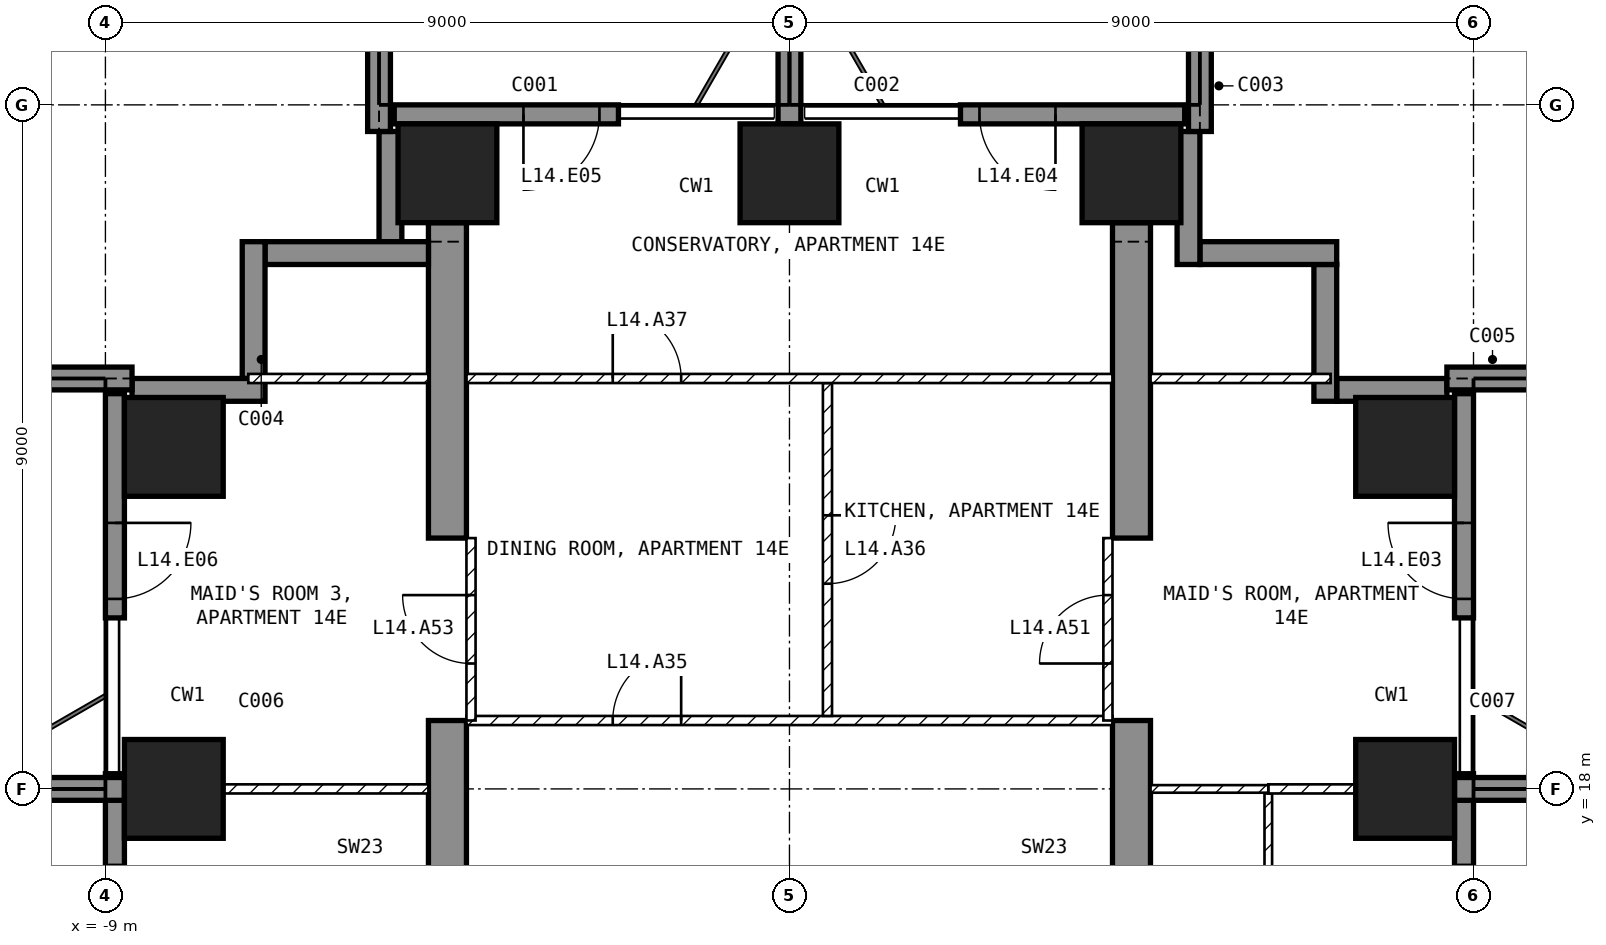
"""IFC4 building model, lengths in metres.
Left out: names, types, materials, properties, quantities, classifications, styles, units other than length and angle.
Written with IfcOpenShell. Run it as: python <this file> out.ifc"""

import sys

from ifc_helpers import new_model, si_unit, direction, frame, frame_2d, origin, origin_2d, place, context, subcontext, project, spatial, polyline, rectangle, outline, extrude, element, fill, save


model = new_model("IFC4")
c1 = context("Model", 3, precision=1e-05, world=origin(), true_north=direction((0.0, 1.0)))
c2 = subcontext(c1, "Body", "Model", "MODEL_VIEW")
j1 = project(units=[si_unit("LENGTHUNIT", "METRE"), si_unit("PLANEANGLEUNIT", "RADIAN")], contexts=[c1])
p1 = place(None, origin())
s1 = spatial("IfcSite", under=j1, at=p1, CompositionType="ELEMENT")
p2 = place(p1, origin())
s2 = spatial("IfcBuilding", under=s1, at=p2, CompositionType="ELEMENT")
p3 = place(p2, frame((0.0, 0.0, 68.0)))
s3 = spatial("IfcBuildingStorey", under=s2, at=p3, CompositionType="ELEMENT", Elevation=68.0)
for number, where, z_axis, x_axis in (
    (1, (-8.1, 18.0, -0.25), (0.0, 0.0, 1.0), (1.0, 0.0, 0.0)),
    (2, (-8.1, 22.5, -0.25), (0.0, 0.0, 1.0), (1.0, 0.0, 0.0)),
    (3, (-4.5, 26.1, -0.25), (0.0, 0.0, 1.0), (1.0, 0.0, 0.0)),
    (4, (0.0, 26.1, -0.25), (0.0, 0.0, 1.0), (1.0, 0.0, 0.0)),
    (5, (4.5, 26.1, -0.25), (0.0, 0.0, 1.0), (1.0, 0.0, 0.0)),
    (6, (8.1, 18.0, -0.25), (0.0, 0.0, 1.0), (1.0, 0.0, 0.0)),
    (7, (8.1, 22.5, -0.25), (0.0, 0.0, 1.0), (1.0, 0.0, 0.0)),
):
    element("IfcColumn", number, at=place(p3, frame(where, z_axis=z_axis, x_axis=x_axis)), inside=s3, PredefinedType="COLUMN", context=c2, shape_type="SweptSolid", body=[
        extrude(rectangle(XDim=1.3, YDim=1.3, at=origin_2d()), origin(), (0.0, 0.0, 1.0), 3.5),
    ])
for number, where, z_axis, x_axis in (
    (8, (-4.75, 9.0, -0.25), (1.0, 0.0, 0.0), (0.0, 1.0, 0.0)),
    (9, (4.25, 9.0, -0.25), (1.0, 0.0, 0.0), (0.0, 1.0, 0.0)),
):
    element("IfcWall", number, at=place(p3, frame(where, z_axis=z_axis, x_axis=x_axis)), inside=s3, PredefinedType="SHEAR", context=c2, shape_type="SweptSolid", body=[
        extrude(outline(polyline([(0.0, 0.0), (2.1, 0.0), (2.1, 2.65), (4.5, 2.65), (4.5, 0.0), (9.9, 0.0), (9.9, 2.65), (12.3, 2.65), (12.3, 0.0), (16.45, 0.0), (16.45, 3.5), (0.0, 3.5), (0.0, 0.0)])), origin(), (0.0, 0.0, 1.0), 0.5),
    ])
p4 = place(p3, frame((8.875, 15.55, 0.0), z_axis=(0.0, 0.0, 1.0), x_axis=(0.0, 1.0, 0.0)))
e10 = element("IfcWall", 10, at=p4, inside=s3, PredefinedType="SOLIDWALL", context=c2, shape_type="SweptSolid", body=[
    extrude(rectangle(XDim=2.65, YDim=0.25, at=frame_2d((1.325, 0.0))), origin(), (0.0, 0.0, 1.0), 3.25),
])
p5 = place(p4, frame((0.25, 0.0, 0.0)))
e11 = element("IfcOpeningElement", 11, at=p5, cuts=e10, PredefinedType="OPENING", context=c2, shape_type="SweptSolid", body=[
    extrude(rectangle(XDim=1.2, YDim=2.4, at=frame_2d((0.6, 1.2))), frame((0.0, 0.135, 0.0), z_axis=(0.0, -1.0, 0.0), x_axis=(1.0, 0.0, 0.0)), (0.0, 0.0, 1.0), 0.27),
])
p6 = place(p3, frame((8.875, 20.25, 0.0), z_axis=(0.0, 0.0, 1.0), x_axis=(0.0, 1.0, 0.0)))
e12 = element("IfcWall", 12, at=p6, inside=s3, PredefinedType="SOLIDWALL", context=c2, shape_type="SweptSolid", body=[
    extrude(rectangle(XDim=2.95, YDim=0.25, at=frame_2d((1.475, 0.0))), origin(), (0.0, 0.0, 1.0), 3.25),
])
p7 = place(p6, frame((0.25, 0.0, 0.0)))
e13 = element("IfcOpeningElement", 13, at=p7, cuts=e12, PredefinedType="OPENING", context=c2, shape_type="SweptSolid", body=[
    extrude(rectangle(XDim=1.0, YDim=2.4, at=frame_2d((0.5, 1.2))), frame((0.0, 0.135, 0.0), z_axis=(0.0, -1.0, 0.0), x_axis=(1.0, 0.0, 0.0)), (0.0, 0.0, 1.0), 0.27),
])
p8 = place(p3, frame((5.2, 26.875, 0.0), z_axis=(0.0, 0.0, 1.0), x_axis=(-1.0, 0.0, 0.0)))
e14 = element("IfcWall", 14, at=p8, inside=s3, PredefinedType="SOLIDWALL", context=c2, shape_type="SweptSolid", body=[
    extrude(rectangle(XDim=2.95, YDim=0.25, at=frame_2d((1.475, 0.0))), origin(), (0.0, 0.0, 1.0), 3.25),
])
p9 = place(p8, frame((1.7, 0.0, 0.0)))
e15 = element("IfcOpeningElement", 15, at=p9, cuts=e14, PredefinedType="OPENING", context=c2, shape_type="SweptSolid", body=[
    extrude(rectangle(XDim=1.0, YDim=2.4, at=frame_2d((0.5, 1.2))), frame((0.0, 0.135, 0.0), z_axis=(0.0, -1.0, 0.0), x_axis=(1.0, 0.0, 0.0)), (0.0, 0.0, 1.0), 0.27),
])
p10 = place(p3, frame((-2.25, 26.875, 0.0), z_axis=(0.0, 0.0, 1.0), x_axis=(-1.0, 0.0, 0.0)))
e16 = element("IfcWall", 16, at=p10, inside=s3, PredefinedType="SOLIDWALL", context=c2, shape_type="SweptSolid", body=[
    extrude(rectangle(XDim=2.95, YDim=0.25, at=frame_2d((1.475, 0.0))), origin(), (0.0, 0.0, 1.0), 3.25),
])
p11 = place(p10, frame((0.25, 0.0, 0.0)))
e17 = element("IfcOpeningElement", 17, at=p11, cuts=e16, PredefinedType="OPENING", context=c2, shape_type="SweptSolid", body=[
    extrude(rectangle(XDim=1.0, YDim=2.4, at=frame_2d((0.5, 1.2))), frame((0.0, 0.135, 0.0), z_axis=(0.0, -1.0, 0.0), x_axis=(1.0, 0.0, 0.0)), (0.0, 0.0, 1.0), 0.27),
])
p12 = place(p3, frame((-8.875, 23.2, 0.0), z_axis=(0.0, 0.0, 1.0), x_axis=(0.0, -1.0, 0.0)))
e18 = element("IfcWall", 18, at=p12, inside=s3, PredefinedType="SOLIDWALL", context=c2, shape_type="SweptSolid", body=[
    extrude(rectangle(XDim=2.95, YDim=0.25, at=frame_2d((1.475, 0.0))), origin(), (0.0, 0.0, 1.0), 3.25),
])
p13 = place(p12, frame((1.7, 0.0, 0.0)))
e19 = element("IfcOpeningElement", 19, at=p13, cuts=e18, PredefinedType="OPENING", context=c2, shape_type="SweptSolid", body=[
    extrude(rectangle(XDim=1.0, YDim=2.4, at=frame_2d((0.5, 1.2))), frame((0.0, 0.135, 0.0), z_axis=(0.0, -1.0, 0.0), x_axis=(1.0, 0.0, 0.0)), (0.0, 0.0, 1.0), 0.27),
])
p14 = place(p3, frame((-8.875, 18.2, 0.0), z_axis=(0.0, 0.0, 1.0), x_axis=(0.0, -1.0, 0.0)))
e20 = element("IfcWall", 20, at=p14, inside=s3, PredefinedType="SOLIDWALL", context=c2, shape_type="SweptSolid", body=[
    extrude(rectangle(XDim=2.65, YDim=0.25, at=frame_2d((1.325, 0.0))), origin(), (0.0, 0.0, 1.0), 3.25),
])
p15 = place(p14, frame((1.2, 0.0, 0.0)))
e21 = element("IfcOpeningElement", 21, at=p15, cuts=e20, PredefinedType="OPENING", context=c2, shape_type="SweptSolid", body=[
    extrude(rectangle(XDim=1.2, YDim=2.4, at=frame_2d((0.6, 1.2))), frame((0.0, 0.135, 0.0), z_axis=(0.0, -1.0, 0.0), x_axis=(1.0, 0.0, 0.0)), (0.0, 0.0, 1.0), 0.27),
])
p16 = place(p3, frame((8.65, 23.25, 0.0), z_axis=(0.0, 0.0, 1.0), x_axis=(-1.0, 0.0, 0.0)))
e22 = element("IfcWall", 22, at=p16, inside=s3, PredefinedType="SOLIDWALL", context=c2, shape_type="SweptSolid", body=[
    extrude(rectangle(XDim=1.45, YDim=0.3, at=frame_2d((0.725, 0.0))), origin(), (0.0, 0.0, 1.0), 3.25),
])
p17 = place(p3, frame((7.05, 23.1, 0.0), z_axis=(0.0, 0.0, 1.0), x_axis=(0.0, 1.0, 0.0)))
e23 = element("IfcWall", 23, at=p17, inside=s3, PredefinedType="SOLIDWALL", context=c2, shape_type="SweptSolid", body=[
    extrude(rectangle(XDim=1.8, YDim=0.3, at=frame_2d((0.9, 0.0))), origin(), (0.0, 0.0, 1.0), 3.25),
])
p18 = place(p3, frame((7.2, 25.05, 0.0), z_axis=(0.0, 0.0, 1.0), x_axis=(-1.0, 0.0, 0.0)))
e24 = element("IfcWall", 24, at=p18, inside=s3, PredefinedType="SOLIDWALL", context=c2, shape_type="SweptSolid", body=[
    extrude(rectangle(XDim=1.8, YDim=0.3, at=frame_2d((0.9, 0.0))), origin(), (0.0, 0.0, 1.0), 3.25),
])
p19 = place(p3, frame((5.25, 24.9, 0.0), z_axis=(0.0, 0.0, 1.0), x_axis=(0.0, 1.0, 0.0)))
e25 = element("IfcWall", 25, at=p19, inside=s3, PredefinedType="SOLIDWALL", context=c2, shape_type="SweptSolid", body=[
    extrude(rectangle(XDim=1.75, YDim=0.3, at=frame_2d((0.875, 0.0))), origin(), (0.0, 0.0, 1.0), 3.25),
])
p20 = place(p3, frame((-5.25, 26.65, 0.0), z_axis=(0.0, 0.0, 1.0), x_axis=(0.0, -1.0, 0.0)))
e26 = element("IfcWall", 26, at=p20, inside=s3, PredefinedType="SOLIDWALL", context=c2, shape_type="SweptSolid", body=[
    extrude(rectangle(XDim=1.45, YDim=0.3, at=frame_2d((0.725, 0.0))), origin(), (0.0, 0.0, 1.0), 3.25),
])
p21 = place(p3, frame((-4.75, 25.05, 0.0), z_axis=(0.0, 0.0, 1.0), x_axis=(-1.0, 0.0, 0.0)))
e27 = element("IfcWall", 27, at=p21, inside=s3, PredefinedType="SOLIDWALL", context=c2, shape_type="SweptSolid", body=[
    extrude(rectangle(XDim=2.15, YDim=0.3, at=frame_2d((1.075, 0.0))), origin(), (0.0, 0.0, 1.0), 3.25),
])
p22 = place(p3, frame((-7.05, 25.2, 0.0), z_axis=(0.0, 0.0, 1.0), x_axis=(0.0, -1.0, 0.0)))
e28 = element("IfcWall", 28, at=p22, inside=s3, PredefinedType="SOLIDWALL", context=c2, shape_type="SweptSolid", body=[
    extrude(rectangle(XDim=1.8, YDim=0.3, at=frame_2d((0.9, 0.0))), origin(), (0.0, 0.0, 1.0), 3.25),
])
p23 = place(p3, frame((-6.9, 23.25, 0.0), z_axis=(0.0, 0.0, 1.0), x_axis=(-1.0, 0.0, 0.0)))
e29 = element("IfcWall", 29, at=p23, inside=s3, PredefinedType="SOLIDWALL", context=c2, shape_type="SweptSolid", body=[
    extrude(rectangle(XDim=1.75, YDim=0.3, at=frame_2d((0.875, 0.0))), origin(), (0.0, 0.0, 1.0), 3.25),
])
p24 = place(p3, frame((-8.75, 18.0, 0.0), z_axis=(0.0, 0.0, 1.0), x_axis=(-1.0, 0.0, 0.0)))
e30 = element("IfcWall", 30, at=p24, inside=s3, PredefinedType="SOLIDWALL", context=c2, shape_type="SweptSolid", body=[
    extrude(rectangle(XDim=2.95, YDim=0.3, at=frame_2d((1.475, 0.0))), origin(), (0.0, 0.0, 1.0), 3.25),
])
for number, where, z_axis, x_axis in (
    (31, (-8.65, 23.4, 0.0), (0.0, 0.0, 1.0), (-1.0, 0.0, 0.0)),
    (32, (-5.4, 26.65, 0.0), (0.0, 0.0, 1.0), (0.0, 1.0, 0.0)),
):
    element("IfcWall", number, at=place(p3, frame(where, z_axis=z_axis, x_axis=x_axis)), inside=s3, PredefinedType="SOLIDWALL", context=c2, shape_type="SweptSolid", body=[
        extrude(rectangle(XDim=3.05, YDim=0.3, at=frame_2d((1.525, 0.0))), origin(), (0.0, 0.0, 1.0), 3.25),
    ])
p25 = place(p3, frame((0.0, 26.75, 0.0), z_axis=(0.0, 0.0, 1.0), x_axis=(0.0, 1.0, 0.0)))
e33 = element("IfcWall", 33, at=p25, inside=s3, PredefinedType="SOLIDWALL", context=c2, shape_type="SweptSolid", body=[
    extrude(rectangle(XDim=2.95, YDim=0.3, at=frame_2d((1.475, 0.0))), origin(), (0.0, 0.0, 1.0), 3.25),
])
p26 = place(p3, frame((5.4, 26.65, 0.0), z_axis=(0.0, 0.0, 1.0), x_axis=(0.0, 1.0, 0.0)))
e34 = element("IfcWall", 34, at=p26, inside=s3, PredefinedType="SOLIDWALL", context=c2, shape_type="SweptSolid", body=[
    extrude(rectangle(XDim=3.05, YDim=0.3, at=frame_2d((1.525, 0.0))), origin(), (0.0, 0.0, 1.0), 3.25),
])
p27 = place(p3, frame((8.75, 18.0, 0.0), z_axis=(0.0, 0.0, 1.0), x_axis=(1.0, 0.0, 0.0)))
e35 = element("IfcWall", 35, at=p27, inside=s3, PredefinedType="SOLIDWALL", context=c2, shape_type="SweptSolid", body=[
    extrude(rectangle(XDim=2.95, YDim=0.3, at=frame_2d((1.475, 0.0))), origin(), (0.0, 0.0, 1.0), 3.25),
])
p28 = place(p3, frame((8.65, 23.4, 0.0), z_axis=(0.0, 0.0, 1.0), x_axis=(1.0, 0.0, 0.0)))
e36 = element("IfcWall", 36, at=p28, inside=s3, PredefinedType="SOLIDWALL", context=c2, shape_type="SweptSolid", body=[
    extrude(rectangle(XDim=3.05, YDim=0.3, at=frame_2d((1.525, 0.0))), origin(), (0.0, 0.0, 1.0), 3.25),
])
p29 = place(p3, frame((-4.25, 18.9, 0.0), z_axis=(0.0, 0.0, 1.0), x_axis=(1.0, 0.0, 0.0)))
e37 = element("IfcWall", 37, at=p29, inside=s3, PredefinedType="PARTITIONING", context=c2, shape_type="SweptSolid", body=[
    extrude(rectangle(XDim=8.5, YDim=0.12, at=frame_2d((4.25, 0.0))), origin(), (0.0, 0.0, 1.0), 3.25),
])
p30 = place(p29, frame((1.925, 0.0, 0.0)))
e38 = element("IfcOpeningElement", 38, at=p30, cuts=e37, PredefinedType="OPENING", context=c2, shape_type="SweptSolid", body=[
    extrude(rectangle(XDim=0.9, YDim=2.1, at=frame_2d((0.45, 1.05))), frame((0.0, 0.07, 0.0), z_axis=(0.0, -1.0, 0.0), x_axis=(1.0, 0.0, 0.0)), (0.0, 0.0, 1.0), 0.14),
])
p31 = place(p3, frame((0.5, 23.34, 0.0), z_axis=(0.0, 0.0, 1.0), x_axis=(0.0, -1.0, 0.0)))
e39 = element("IfcWall", 39, at=p31, inside=s3, PredefinedType="PARTITIONING", context=c2, shape_type="SweptSolid", body=[
    extrude(rectangle(XDim=4.38, YDim=0.12, at=frame_2d((2.19, 0.0))), origin(), (0.0, 0.0, 1.0), 3.25),
])
p32 = place(p31, frame((1.74, 0.0, 0.0)))
e40 = element("IfcOpeningElement", 40, at=p32, cuts=e39, PredefinedType="OPENING", context=c2, shape_type="SweptSolid", body=[
    extrude(rectangle(XDim=0.9, YDim=2.1, at=frame_2d((0.45, 1.05))), frame((0.0, 0.07, 0.0), z_axis=(0.0, -1.0, 0.0), x_axis=(1.0, 0.0, 0.0)), (0.0, 0.0, 1.0), 0.14),
])
p33 = place(p3, frame((-4.25, 23.4, 0.0), z_axis=(0.0, 0.0, 1.0), x_axis=(1.0, 0.0, 0.0)))
e41 = element("IfcWall", 41, at=p33, inside=s3, PredefinedType="PARTITIONING", context=c2, shape_type="SweptSolid", body=[
    extrude(rectangle(XDim=8.5, YDim=0.12, at=frame_2d((4.25, 0.0))), origin(), (0.0, 0.0, 1.0), 3.25),
])
p34 = place(p33, frame((1.925, 0.0, 0.0)))
e42 = element("IfcOpeningElement", 42, at=p34, cuts=e41, PredefinedType="OPENING", context=c2, shape_type="SweptSolid", body=[
    extrude(rectangle(XDim=0.9, YDim=2.1, at=frame_2d((0.45, 1.05))), frame((0.0, 0.07, 0.0), z_axis=(0.0, -1.0, 0.0), x_axis=(1.0, 0.0, 0.0)), (0.0, 0.0, 1.0), 0.14),
])
p35 = place(p3, frame((6.3, 14.45, 0.0), z_axis=(0.0, 0.0, 1.0), x_axis=(0.0, 1.0, 0.0)))
e43 = element("IfcWall", 43, at=p35, inside=s3, PredefinedType="PARTITIONING", context=c2, shape_type="SweptSolid", body=[
    extrude(rectangle(XDim=3.49, YDim=0.1, at=frame_2d((1.745, 0.0))), origin(), (0.0, 0.0, 1.0), 3.25),
])
p36 = place(p3, frame((6.3, 18.0, 0.0), z_axis=(0.0, 0.0, 1.0), x_axis=(1.0, 0.0, 0.0)))
e44 = element("IfcWall", 44, at=p36, inside=s3, PredefinedType="PARTITIONING", context=c2, shape_type="SweptSolid", body=[
    extrude(rectangle(XDim=1.15, YDim=0.12, at=frame_2d((0.575, 0.0))), origin(), (0.0, 0.0, 1.0), 2.346),
])
p37 = place(p3, frame((4.75, 18.0, 0.0), z_axis=(0.0, 0.0, 1.0), x_axis=(1.0, 0.0, 0.0)))
e45 = element("IfcWall", 45, at=p37, inside=s3, PredefinedType="PARTITIONING", context=c2, shape_type="SweptSolid", body=[
    extrude(rectangle(XDim=1.55, YDim=0.1, at=frame_2d((0.775, 0.0))), origin(), (0.0, 0.0, 1.0), 2.346),
])
p38 = place(p3, frame((4.75, 23.4, 0.0), z_axis=(0.0, 0.0, 1.0), x_axis=(1.0, 0.0, 0.0)))
e46 = element("IfcWall", 46, at=p38, inside=s3, PredefinedType="PARTITIONING", context=c2, shape_type="SweptSolid", body=[
    extrude(rectangle(XDim=2.37, YDim=0.12, at=frame_2d((1.185, 0.0))), origin(), (0.0, 0.0, 1.0), 3.25),
])
p39 = place(p3, frame((-7.45, 18.0, 0.0), z_axis=(0.0, 0.0, 1.0), x_axis=(1.0, 0.0, 0.0)))
e47 = element("IfcWall", 47, at=p39, inside=s3, PredefinedType="PARTITIONING", context=c2, shape_type="SweptSolid", body=[
    extrude(rectangle(XDim=2.7, YDim=0.12, at=frame_2d((1.35, 0.0))), origin(), (0.0, 0.0, 1.0), 2.346),
])
p40 = place(p3, frame((-7.12, 23.4, 0.0), z_axis=(0.0, 0.0, 1.0), x_axis=(1.0, 0.0, 0.0)))
e48 = element("IfcWall", 48, at=p40, inside=s3, PredefinedType="PARTITIONING", context=c2, shape_type="SweptSolid", body=[
    extrude(rectangle(XDim=2.37, YDim=0.12, at=frame_2d((1.185, 0.0))), origin(), (0.0, 0.0, 1.0), 3.25),
])
p41 = place(p3, frame((4.19, 18.9, 0.0), z_axis=(0.0, 0.0, 1.0), x_axis=(0.0, 1.0, 0.0)))
e49 = element("IfcWall", 49, at=p41, inside=s3, PredefinedType="PARTITIONING", context=c2, shape_type="SweptSolid", body=[
    extrude(rectangle(XDim=2.4, YDim=0.12, at=frame_2d((1.2, 0.0))), origin(), (0.0, 0.0, 1.0), 2.4),
])
p42 = place(p41, frame((0.75, 0.0, 0.0)))
e50 = element("IfcOpeningElement", 50, at=p42, cuts=e49, PredefinedType="OPENING", context=c2, shape_type="SweptSolid", body=[
    extrude(rectangle(XDim=0.9, YDim=2.1, at=frame_2d((0.45, 1.05))), frame((0.0, 0.07, 0.0), z_axis=(0.0, -1.0, 0.0), x_axis=(1.0, 0.0, 0.0)), (0.0, 0.0, 1.0), 0.14),
])
p43 = place(p3, frame((-4.19, 18.9, 0.0), z_axis=(0.0, 0.0, 1.0), x_axis=(0.0, 1.0, 0.0)))
e51 = element("IfcWall", 51, at=p43, inside=s3, PredefinedType="PARTITIONING", context=c2, shape_type="SweptSolid", body=[
    extrude(rectangle(XDim=2.4, YDim=0.12, at=frame_2d((1.2, 0.0))), origin(), (0.0, 0.0, 1.0), 2.4),
])
p44 = place(p43, frame((0.75, 0.0, 0.0)))
e52 = element("IfcOpeningElement", 52, at=p44, cuts=e51, PredefinedType="OPENING", context=c2, shape_type="SweptSolid", body=[
    extrude(rectangle(XDim=0.9, YDim=2.1, at=frame_2d((0.45, 1.05))), frame((0.0, 0.07, 0.0), z_axis=(0.0, -1.0, 0.0), x_axis=(1.0, 0.0, 0.0)), (0.0, 0.0, 1.0), 0.14),
])
p45 = place(p5, origin())
e53 = element("IfcDoor", 53, at=p45, inside=s3, OperationType="SINGLE_SWING_LEFT", PredefinedType="DOOR", context=c2, shape_type="SweptSolid", body=[
    extrude(rectangle(XDim=1.2, YDim=2.4, at=frame_2d((0.6, 1.2))), frame((0.0, 0.025, 0.0), z_axis=(0.0, -1.0, 0.0), x_axis=(1.0, 0.0, 0.0)), (0.0, 0.0, 1.0), 0.05),
])
fill(e11, e53)
p46 = place(p7, origin())
e54 = element("IfcDoor", 54, at=p46, inside=s3, OperationType="SINGLE_SWING_RIGHT", PredefinedType="DOOR", context=c2, shape_type="SweptSolid", body=[
    extrude(rectangle(XDim=1.0, YDim=2.4, at=frame_2d((0.5, 1.2))), frame((0.0, 0.025, 0.0), z_axis=(0.0, -1.0, 0.0), x_axis=(1.0, 0.0, 0.0)), (0.0, 0.0, 1.0), 0.05),
])
fill(e13, e54)
p47 = place(p9, origin())
e55 = element("IfcDoor", 55, at=p47, inside=s3, OperationType="SINGLE_SWING_LEFT", PredefinedType="DOOR", context=c2, shape_type="SweptSolid", body=[
    extrude(rectangle(XDim=1.0, YDim=2.4, at=frame_2d((0.5, 1.2))), frame((0.0, 0.025, 0.0), z_axis=(0.0, -1.0, 0.0), x_axis=(1.0, 0.0, 0.0)), (0.0, 0.0, 1.0), 0.05),
])
fill(e15, e55)
p48 = place(p11, origin())
e56 = element("IfcDoor", 56, at=p48, inside=s3, OperationType="SINGLE_SWING_RIGHT", PredefinedType="DOOR", context=c2, shape_type="SweptSolid", body=[
    extrude(rectangle(XDim=1.0, YDim=2.4, at=frame_2d((0.5, 1.2))), frame((0.0, 0.025, 0.0), z_axis=(0.0, -1.0, 0.0), x_axis=(1.0, 0.0, 0.0)), (0.0, 0.0, 1.0), 0.05),
])
fill(e17, e56)
p49 = place(p13, origin())
e57 = element("IfcDoor", 57, at=p49, inside=s3, OperationType="SINGLE_SWING_LEFT", PredefinedType="DOOR", context=c2, shape_type="SweptSolid", body=[
    extrude(rectangle(XDim=1.0, YDim=2.4, at=frame_2d((0.5, 1.2))), frame((0.0, 0.025, 0.0), z_axis=(0.0, -1.0, 0.0), x_axis=(1.0, 0.0, 0.0)), (0.0, 0.0, 1.0), 0.05),
])
fill(e19, e57)
p50 = place(p30, origin())
e58 = element("IfcDoor", 58, at=p50, inside=s3, OperationType="SINGLE_SWING_RIGHT", PredefinedType="DOOR", context=c2, shape_type="SweptSolid", body=[
    extrude(rectangle(XDim=0.9, YDim=2.1, at=frame_2d((0.45, 1.05))), frame((0.0, 0.025, 0.0), z_axis=(0.0, -1.0, 0.0), x_axis=(1.0, 0.0, 0.0)), (0.0, 0.0, 1.0), 0.05),
])
fill(e38, e58)
p51 = place(p32, origin())
e59 = element("IfcDoor", 59, at=p51, inside=s3, OperationType="SINGLE_SWING_LEFT", PredefinedType="DOOR", context=c2, shape_type="SweptSolid", body=[
    extrude(rectangle(XDim=0.9, YDim=2.1, at=frame_2d((0.45, 1.05))), frame((0.0, 0.025, 0.0), z_axis=(0.0, -1.0, 0.0), x_axis=(1.0, 0.0, 0.0)), (0.0, 0.0, 1.0), 0.05),
])
fill(e40, e59)
p52 = place(p34, origin())
e60 = element("IfcDoor", 60, at=p52, inside=s3, OperationType="SINGLE_SWING_LEFT", PredefinedType="DOOR", context=c2, shape_type="SweptSolid", body=[
    extrude(rectangle(XDim=0.9, YDim=2.1, at=frame_2d((0.45, 1.05))), frame((0.0, 0.025, 0.0), z_axis=(0.0, -1.0, 0.0), x_axis=(1.0, 0.0, 0.0)), (0.0, 0.0, 1.0), 0.05),
])
fill(e42, e60)
p53 = place(p42, origin())
e61 = element("IfcDoor", 61, at=p53, inside=s3, OperationType="SINGLE_SWING_LEFT", PredefinedType="DOOR", context=c2, shape_type="SweptSolid", body=[
    extrude(rectangle(XDim=0.9, YDim=2.1, at=frame_2d((0.45, 1.05))), frame((0.0, 0.025, 0.0), z_axis=(0.0, -1.0, 0.0), x_axis=(1.0, 0.0, 0.0)), (0.0, 0.0, 1.0), 0.05),
])
fill(e50, e61)
p54 = place(p44, origin())
e62 = element("IfcDoor", 62, at=p54, inside=s3, OperationType="SINGLE_SWING_RIGHT", PredefinedType="DOOR", context=c2, shape_type="SweptSolid", body=[
    extrude(rectangle(XDim=0.9, YDim=2.1, at=frame_2d((0.45, 1.05))), frame((0.0, 0.025, 0.0), z_axis=(0.0, -1.0, 0.0), x_axis=(1.0, 0.0, 0.0)), (0.0, 0.0, 1.0), 0.05),
])
fill(e52, e62)
save(model, sys.argv[1])
